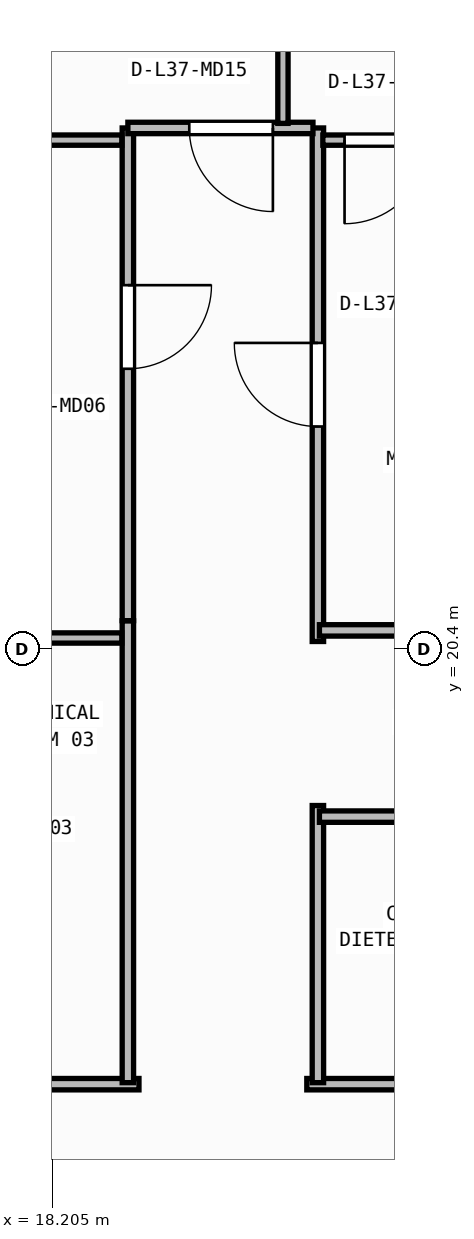
"""IFC4 building model, lengths in metres.
Left out: names, types, materials, properties, quantities, classifications, styles, units other than length and angle.
Written with IfcOpenShell. Run it as: python <this file> out.ifc"""

import sys

from ifc_helpers import new_model, si_unit, direction, frame, frame_2d, origin, place, context, subcontext, project, spatial, rectangle, extrude, element, fill, save


model = new_model("IFC4")
c1 = context("Model", 3, precision=1e-05, world=origin(), true_north=direction((0.0, 1.0)))
c2 = subcontext(c1, "Body", "Model", "MODEL_VIEW")
j1 = project(units=[si_unit("LENGTHUNIT", "METRE"), si_unit("PLANEANGLEUNIT", "RADIAN")], contexts=[c1])
p1 = place(None, origin())
s1 = spatial("IfcSite", under=j1, at=p1, CompositionType="ELEMENT")
p2 = place(p1, origin())
s2 = spatial("IfcBuilding", under=s1, at=p2, CompositionType="ELEMENT")
p3 = place(p2, frame((0.0, 0.0, 150.75)))
s3 = spatial("IfcBuildingStorey", under=s2, at=p3, CompositionType="ELEMENT", Elevation=150.75)
p4 = place(p3, frame((19.346, 14.68, 0.0), z_axis=(0.0, 0.0, 1.0), x_axis=(-1.0, 0.0, 0.0)))
e1 = element("IfcWall", 1, at=p4, inside=s3, PredefinedType="PARTITIONING", context=c2, shape_type="SweptSolid", body=[
    extrude(rectangle(XDim=4.778, YDim=0.15, at=frame_2d((2.389, 0.0))), origin(), (0.0, 0.0, 1.0), 3.71),
])
p5 = place(p4, frame((1.839, 0.0, 0.0)))
e2 = element("IfcOpeningElement", 2, at=p5, cuts=e1, PredefinedType="OPENING", context=c2, shape_type="SweptSolid", body=[
    extrude(rectangle(XDim=1.1, YDim=2.1, at=frame_2d((0.55, 1.05))), frame((0.0, 0.085, 0.0), z_axis=(0.0, -1.0, 0.0), x_axis=(1.0, 0.0, 0.0)), (0.0, 0.0, 1.0), 0.17),
])
p6 = place(p3, frame((29.806, 14.68, 0.0), z_axis=(0.0, 0.0, 1.0), x_axis=(-1.0, 0.0, 0.0)))
e3 = element("IfcWall", 3, at=p6, inside=s3, PredefinedType="PARTITIONING", context=c2, shape_type="SweptSolid", body=[
    extrude(rectangle(XDim=8.252, YDim=0.15, at=frame_2d((4.126, 0.0))), origin(), (0.0, 0.0, 1.0), 3.71),
])
p7 = place(p6, frame((3.576, 0.0, 0.0)))
e4 = element("IfcOpeningElement", 4, at=p7, cuts=e3, PredefinedType="OPENING", context=c2, shape_type="SweptSolid", body=[
    extrude(rectangle(XDim=1.1, YDim=2.1, at=frame_2d((0.55, 1.05))), frame((0.0, 0.085, 0.0), z_axis=(0.0, -1.0, 0.0), x_axis=(1.0, 0.0, 0.0)), (0.0, 0.0, 1.0), 0.17),
])
p8 = place(p3, frame((19.2, 20.776, 0.0), z_axis=(0.0, 0.0, 1.0), x_axis=(0.0, -1.0, 0.0)))
e5 = element("IfcWall", 5, at=p8, inside=s3, PredefinedType="PARTITIONING", context=c2, shape_type="SweptSolid", body=[
    extrude(rectangle(XDim=6.076, YDim=0.15, at=frame_2d((3.038, 0.0))), origin(), (0.0, 0.0, 1.0), 3.71),
])
p9 = place(p3, frame((21.7, 14.7, 0.0), z_axis=(0.0, 0.0, 1.0), x_axis=(0.0, 1.0, 0.0)))
e6 = element("IfcWall", 6, at=p9, inside=s3, PredefinedType="PARTITIONING", context=c2, shape_type="SweptSolid", body=[
    extrude(rectangle(XDim=3.646, YDim=0.15, at=frame_2d((1.823, 0.0))), origin(), (0.0, 0.0, 1.0), 3.71),
])
p10 = place(p3, frame((19.2, 27.26, 0.0), z_axis=(0.0, 0.0, 1.0), x_axis=(0.0, -1.0, 0.0)))
e7 = element("IfcWall", 7, at=p10, inside=s3, PredefinedType="PARTITIONING", context=c2, shape_type="SweptSolid", body=[
    extrude(rectangle(XDim=6.482, YDim=0.15, at=frame_2d((3.241, 0.0))), origin(), (0.0, 0.0, 1.0), 3.71),
])
p11 = place(p10, frame((2.068, 0.0, 0.0)))
e8 = element("IfcOpeningElement", 8, at=p11, cuts=e7, PredefinedType="OPENING", context=c2, shape_type="SweptSolid", body=[
    extrude(rectangle(XDim=1.1, YDim=2.1, at=frame_2d((0.55, 1.05))), frame((0.0, 0.085, 0.0), z_axis=(0.0, -1.0, 0.0), x_axis=(1.0, 0.0, 0.0)), (0.0, 0.0, 1.0), 0.17),
])
p12 = place(p3, frame((21.7, 20.504, 0.0), z_axis=(0.0, 0.0, 1.0), x_axis=(0.0, 1.0, 0.0)))
e9 = element("IfcWall", 9, at=p12, inside=s3, PredefinedType="PARTITIONING", context=c2, shape_type="SweptSolid", body=[
    extrude(rectangle(XDim=6.756, YDim=0.15, at=frame_2d((3.378, 0.0))), origin(), (0.0, 0.0, 1.0), 3.71),
])
p13 = place(p12, frame((2.828, 0.0, 0.0)))
e10 = element("IfcOpeningElement", 10, at=p13, cuts=e9, PredefinedType="OPENING", context=c2, shape_type="SweptSolid", body=[
    extrude(rectangle(XDim=1.1, YDim=2.1, at=frame_2d((0.55, 1.05))), frame((0.0, 0.085, 0.0), z_axis=(0.0, -1.0, 0.0), x_axis=(1.0, 0.0, 0.0)), (0.0, 0.0, 1.0), 0.17),
])
p14 = place(p3, frame((21.635, 27.26, 0.0), z_axis=(0.0, 0.0, 1.0), x_axis=(-1.0, 0.0, 0.0)))
e11 = element("IfcWall", 11, at=p14, inside=s3, PredefinedType="PARTITIONING", context=c2, shape_type="SweptSolid", body=[
    extrude(rectangle(XDim=2.435, YDim=0.15, at=frame_2d((1.218, 0.0))), origin(), (0.0, 0.0, 1.0), 3.71),
])
p15 = place(p14, frame((0.527, 0.0, 0.0)))
e12 = element("IfcOpeningElement", 12, at=p15, cuts=e11, PredefinedType="OPENING", context=c2, shape_type="SweptSolid", body=[
    extrude(rectangle(XDim=1.1, YDim=2.1, at=frame_2d((0.55, 1.05))), frame((0.0, 0.085, 0.0), z_axis=(0.0, -1.0, 0.0), x_axis=(1.0, 0.0, 0.0)), (0.0, 0.0, 1.0), 0.17),
])
p16 = place(p3, frame((21.72, 18.2, 0.0), z_axis=(0.0, 0.0, 1.0), x_axis=(1.0, 0.0, 0.0)))
e13 = element("IfcWall", 13, at=p16, inside=s3, PredefinedType="PARTITIONING", context=c2, shape_type="SweptSolid", body=[
    extrude(rectangle(XDim=8.086, YDim=0.15, at=frame_2d((4.043, 0.0))), origin(), (0.0, 0.0, 1.0), 3.71),
])
p17 = place(p3, frame((26.916, 20.65, 0.0), z_axis=(0.0, 0.0, 1.0), x_axis=(-1.0, 0.0, 0.0)))
e14 = element("IfcWall", 14, at=p17, inside=s3, PredefinedType="PARTITIONING", context=c2, shape_type="SweptSolid", body=[
    extrude(rectangle(XDim=5.196, YDim=0.15, at=frame_2d((2.598, 0.0))), origin(), (0.0, 0.0, 1.0), 3.083),
])
p18 = place(p3, frame((19.12, 20.55, 0.0), z_axis=(0.0, 0.0, 1.0), x_axis=(-1.0, 0.0, 0.0)))
e15 = element("IfcWall", 15, at=p18, inside=s3, PredefinedType="PARTITIONING", context=c2, shape_type="SweptSolid", body=[
    extrude(rectangle(XDim=4.723, YDim=0.135, at=frame_2d((2.361, 0.0))), origin(), (0.0, 0.0, 1.0), 3.083),
])
p19 = place(p3, frame((19.12, 27.1, 0.0), z_axis=(0.0, 0.0, 1.0), x_axis=(-1.0, 0.0, 0.0)))
e16 = element("IfcWall", 16, at=p19, inside=s3, PredefinedType="PARTITIONING", context=c2, shape_type="SweptSolid", body=[
    extrude(rectangle(XDim=10.653, YDim=0.135, at=frame_2d((5.326, 0.0))), origin(), (0.0, 0.0, 1.0), 3.71),
])
p20 = place(p3, frame((26.69, 27.1, 0.0), z_axis=(0.0, 0.0, 1.0), x_axis=(-1.0, 0.0, 0.0)))
e17 = element("IfcWall", 17, at=p20, inside=s3, PredefinedType="PARTITIONING", context=c2, shape_type="SweptSolid", body=[
    extrude(rectangle(XDim=4.925, YDim=0.135, at=frame_2d((2.462, 0.0))), origin(), (0.0, 0.0, 1.0), 3.71),
])
p21 = place(p20, frame((3.539, 0.0, 0.0)))
e18 = element("IfcOpeningElement", 18, at=p21, cuts=e17, PredefinedType="OPENING", context=c2, shape_type="SweptSolid", body=[
    extrude(rectangle(XDim=1.1, YDim=2.1, at=frame_2d((0.55, 1.05))), frame((0.0, 0.077, 0.0), z_axis=(0.0, -1.0, 0.0), x_axis=(1.0, 0.0, 0.0)), (0.0, 0.0, 1.0), 0.155),
])
p22 = place(p3, frame((21.24, 27.32, 0.0), z_axis=(0.0, 0.0, 1.0), x_axis=(0.0, 1.0, 0.0)))
e19 = element("IfcWall", 19, at=p22, inside=s3, PredefinedType="PARTITIONING", context=c2, shape_type="SweptSolid", body=[
    extrude(rectangle(XDim=5.576, YDim=0.135, at=frame_2d((2.788, 0.0))), origin(), (0.0, 0.0, 1.0), 3.71),
])
p23 = place(p11, origin())
e20 = element("IfcDoor", 20, at=p23, inside=s3, OperationType="SINGLE_SWING_LEFT", PredefinedType="DOOR", context=c2, shape_type="SweptSolid", body=[
    extrude(rectangle(XDim=1.1, YDim=2.1, at=frame_2d((0.55, 1.05))), frame((0.0, 0.025, 0.0), z_axis=(0.0, -1.0, 0.0), x_axis=(1.0, 0.0, 0.0)), (0.0, 0.0, 1.0), 0.05),
])
fill(e8, e20)
p24 = place(p13, origin())
e21 = element("IfcDoor", 21, at=p24, inside=s3, OperationType="SINGLE_SWING_RIGHT", PredefinedType="DOOR", context=c2, shape_type="SweptSolid", body=[
    extrude(rectangle(XDim=1.1, YDim=2.1, at=frame_2d((0.55, 1.05))), frame((0.0, 0.025, 0.0), z_axis=(0.0, -1.0, 0.0), x_axis=(1.0, 0.0, 0.0)), (0.0, 0.0, 1.0), 0.05),
])
fill(e10, e21)
p25 = place(p15, origin())
e22 = element("IfcDoor", 22, at=p25, inside=s3, OperationType="SINGLE_SWING_LEFT", PredefinedType="DOOR", context=c2, shape_type="SweptSolid", body=[
    extrude(rectangle(XDim=1.1, YDim=2.1, at=frame_2d((0.55, 1.05))), frame((0.0, 0.025, 0.0), z_axis=(0.0, -1.0, 0.0), x_axis=(1.0, 0.0, 0.0)), (0.0, 0.0, 1.0), 0.05),
])
fill(e12, e22)
p26 = place(p21, origin())
e23 = element("IfcDoor", 23, at=p26, inside=s3, OperationType="SINGLE_SWING_RIGHT", PredefinedType="DOOR", context=c2, shape_type="SweptSolid", body=[
    extrude(rectangle(XDim=1.1, YDim=2.1, at=frame_2d((0.55, 1.05))), frame((0.0, 0.025, 0.0), z_axis=(0.0, -1.0, 0.0), x_axis=(1.0, 0.0, 0.0)), (0.0, 0.0, 1.0), 0.05),
])
fill(e18, e23)
save(model, sys.argv[1])
